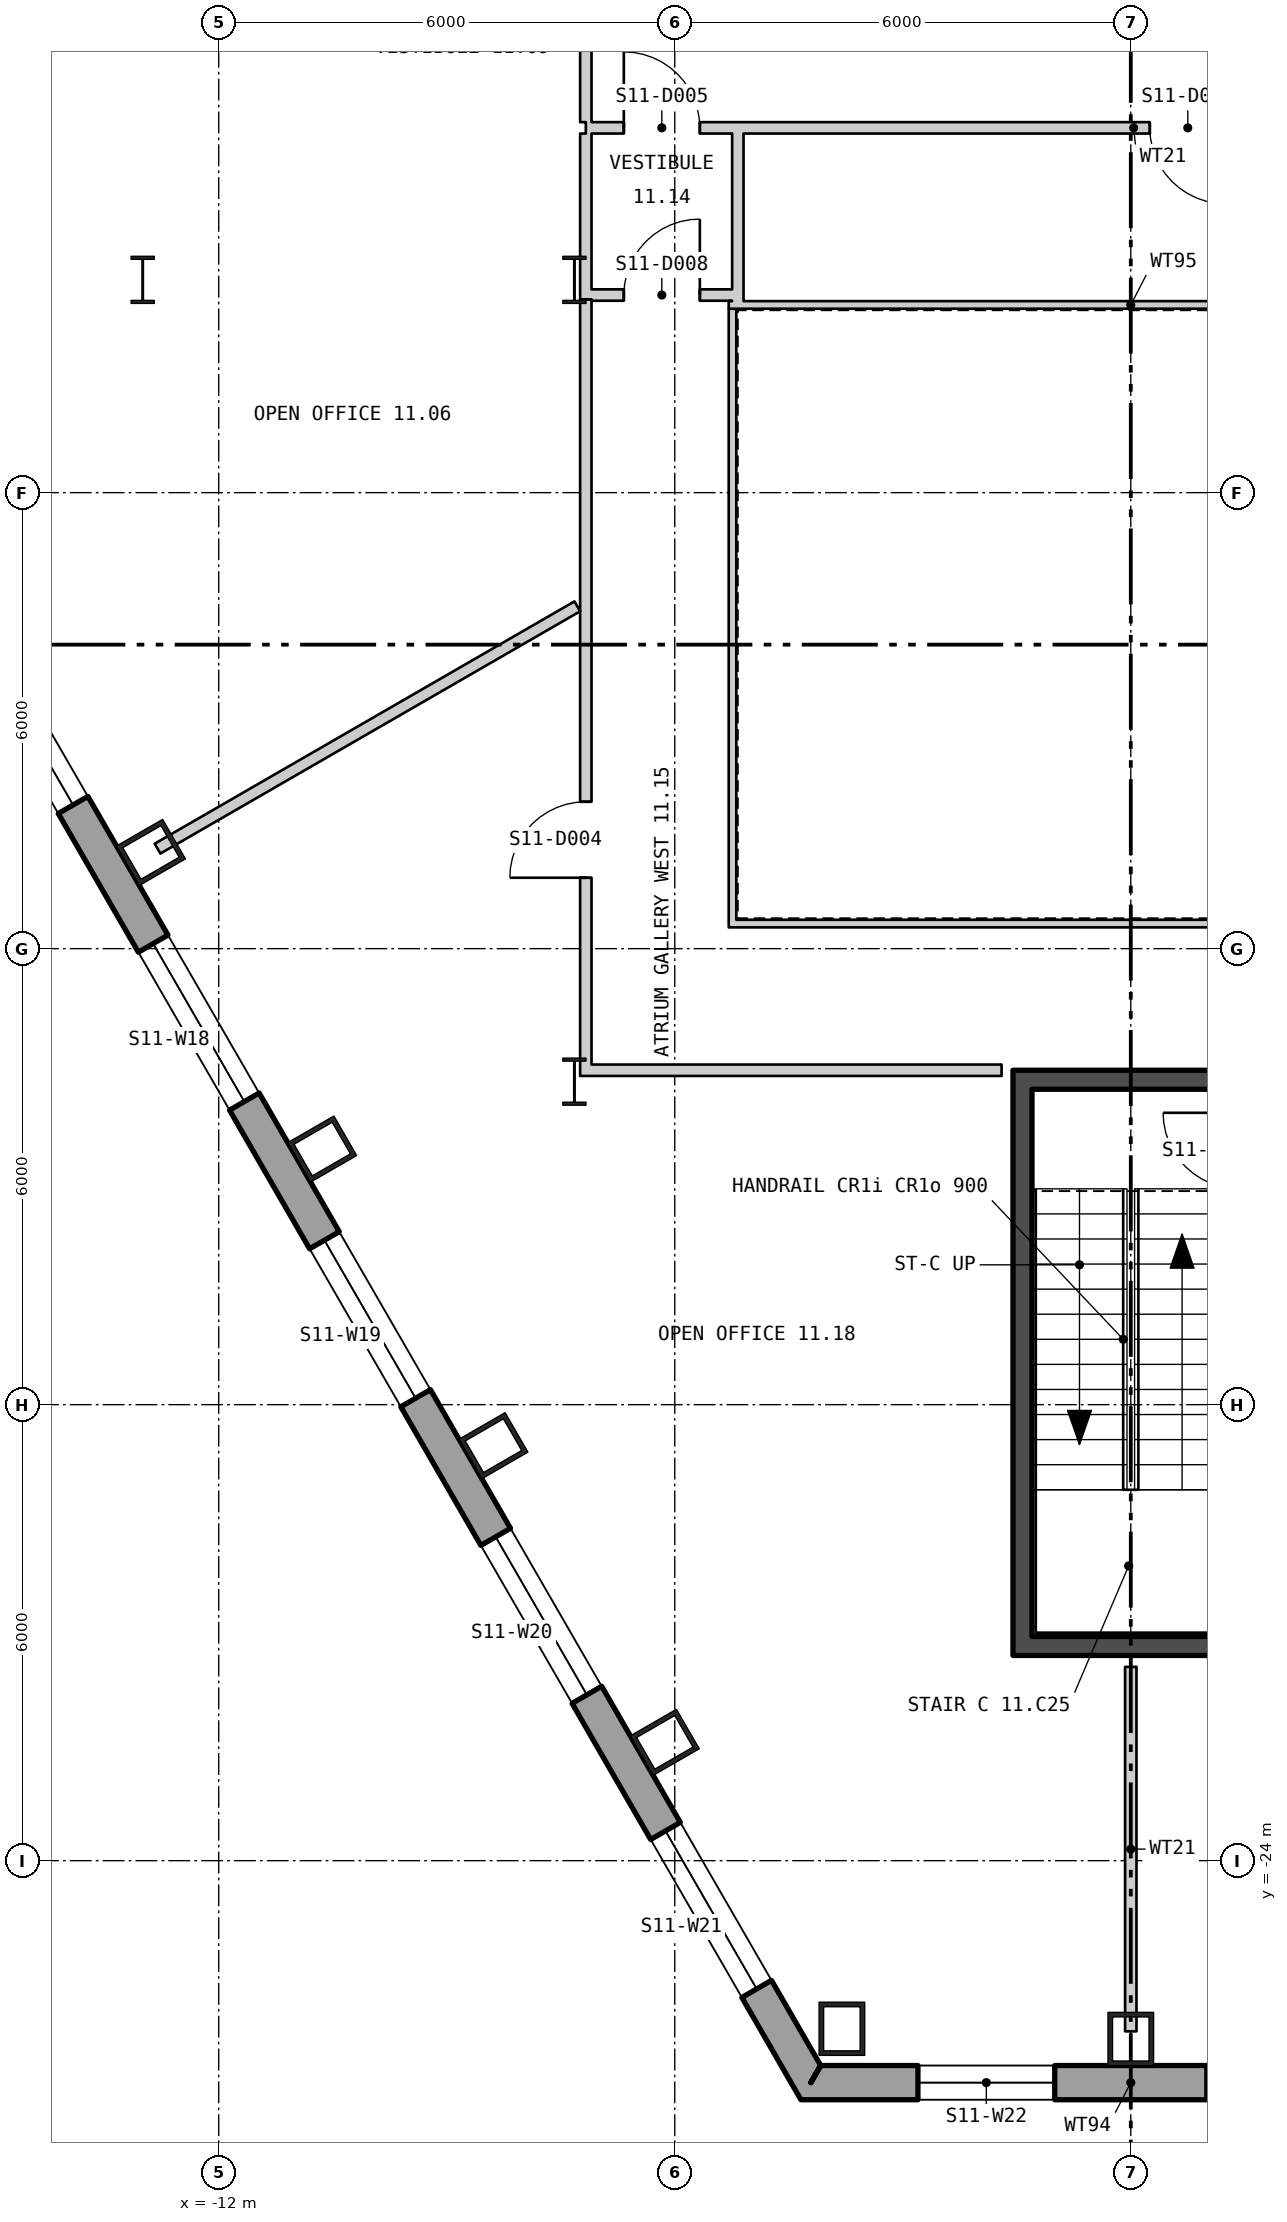
"""IFC4 building model, lengths in metres.
Left out: names, types, materials, properties, quantities, classifications, styles, units other than length and angle.
Written with IfcOpenShell. Run it as: python <this file> out.ifc"""

import sys

from ifc_helpers import new_model, si_unit, direction, frame, frame_2d, origin, origin_2d, place, context, subcontext, project, spatial, polyline, rectangle, hollow_rectangle, i_section, outline, extrude, element, fill, save


model = new_model("IFC4")
c1 = context("Model", 3, precision=1e-05, world=origin(), true_north=direction((0.0, 1.0)))
c2 = subcontext(c1, "Body", "Model", "MODEL_VIEW")
j1 = project(units=[si_unit("LENGTHUNIT", "METRE"), si_unit("PLANEANGLEUNIT", "RADIAN")], contexts=[c1])
p1 = place(None, origin())
s1 = spatial("IfcSite", under=j1, at=p1, CompositionType="ELEMENT")
p2 = place(p1, origin())
s2 = spatial("IfcBuilding", under=s1, at=p2, CompositionType="ELEMENT")
p3 = place(p2, frame((0.0, 0.0, 151.5)))
s3 = spatial("IfcBuildingStorey", under=s2, at=p3, CompositionType="ELEMENT", Elevation=151.5)
for number, where, z_axis, x_axis in (
    (1, (-12.891, -10.734, 0.0), (0.0, 0.0, 1.0), (0.5, -0.866, 0.0)),
    (2, (-10.638, -14.637, 0.0), (0.0, 0.0, 1.0), (0.5, -0.866, 0.0)),
    (3, (-8.385, -18.54, 0.0), (0.0, 0.0, 1.0), (0.5, -0.866, 0.0)),
    (4, (-6.131, -22.443, 0.0), (0.0, 0.0, 1.0), (0.5, -0.866, 0.0)),
    (5, (-3.801, -26.212, 0.0), (0.0, 0.0, 1.0), (1.0, 0.0, 0.0)),
    (6, (0.0, -26.346, 0.0), (0.0, 0.0, 1.0), (1.0, 0.0, 0.0)),
):
    element("IfcColumn", number, at=place(p3, frame(where, z_axis=z_axis, x_axis=x_axis)), inside=s3, PredefinedType="COLUMN", context=c2, shape_type="SweptSolid", body=[
        extrude(hollow_rectangle(XDim=0.6, YDim=0.7, WallThickness=0.06, at=origin_2d()), origin(), (0.0, 0.0, 1.0), 3.9),
    ])
for number, where, z_axis, x_axis in (
    (7, (-7.32, -3.2, 0.0), (0.0, 0.0, 1.0), (1.0, 0.0, 0.0)),
    (8, (-7.32, -13.75, 0.0), (0.0, 0.0, 1.0), (1.0, 0.0, 0.0)),
    (9, (-13.0, -3.2, 0.0), (0.0, 0.0, 1.0), (1.0, 0.0, 0.0)),
):
    element("IfcColumn", number, at=place(p3, frame(where, z_axis=z_axis, x_axis=x_axis)), inside=s3, PredefinedType="COLUMN", context=c2, shape_type="SweptSolid", body=[
        extrude(i_section(OverallWidth=0.305, OverallDepth=0.62, WebThickness=0.021, FlangeThickness=0.04, at=origin_2d()), origin(), (0.0, 0.0, 1.0), 3.9),
    ])
p4 = place(p3, frame((-27.075, 12.683, -0.18), z_axis=(0.0, 0.0, 1.0), x_axis=(0.500000141277, -0.866025322218, 0.0)))
e10 = element("IfcWall", 10, at=p4, inside=s3, PredefinedType="SOLIDWALL", context=c2, shape_type="SweptSolid", body=[
    extrude(outline(polyline([(-0.13, -0.225), (45.86, -0.225), (45.6, 0.225), (0.13, 0.225), (-0.13, -0.225)])), origin(), (0.0, 0.0, 1.0), 3.68),
])
p5 = place(p4, frame((1.424, 0.0, 1.08)))
e11 = element("IfcOpeningElement", 11, at=p5, cuts=e10, PredefinedType="OPENING", context=c2, shape_type="SweptSolid", body=[
    extrude(rectangle(XDim=2.4, YDim=2.0, at=frame_2d((1.2, 1.0))), frame((0.0, 0.235, 0.0), z_axis=(0.0, -1.0, 0.0), x_axis=(1.0, 0.0, 0.0)), (0.0, 0.0, 1.0), 0.47),
])
p6 = place(p4, frame((5.892, 0.0, 1.08)))
e12 = element("IfcOpeningElement", 12, at=p6, cuts=e10, PredefinedType="OPENING", context=c2, shape_type="SweptSolid", body=[
    extrude(rectangle(XDim=2.4, YDim=2.0, at=frame_2d((1.2, 1.0))), frame((0.0, 0.235, 0.0), z_axis=(0.0, -1.0, 0.0), x_axis=(1.0, 0.0, 0.0)), (0.0, 0.0, 1.0), 0.47),
])
p7 = place(p4, frame((10.399, 0.0, 1.08)))
e13 = element("IfcOpeningElement", 13, at=p7, cuts=e10, PredefinedType="OPENING", context=c2, shape_type="SweptSolid", body=[
    extrude(rectangle(XDim=2.4, YDim=2.0, at=frame_2d((1.2, 1.0))), frame((0.0, 0.235, 0.0), z_axis=(0.0, -1.0, 0.0), x_axis=(1.0, 0.0, 0.0)), (0.0, 0.0, 1.0), 0.47),
])
p8 = place(p4, frame((14.905, 0.0, 1.08)))
e14 = element("IfcOpeningElement", 14, at=p8, cuts=e10, PredefinedType="OPENING", context=c2, shape_type="SweptSolid", body=[
    extrude(rectangle(XDim=2.4, YDim=2.0, at=frame_2d((1.2, 1.0))), frame((0.0, 0.235, 0.0), z_axis=(0.0, -1.0, 0.0), x_axis=(1.0, 0.0, 0.0)), (0.0, 0.0, 1.0), 0.47),
])
p9 = place(p4, frame((19.412, 0.0, 1.08)))
e15 = element("IfcOpeningElement", 15, at=p9, cuts=e10, PredefinedType="OPENING", context=c2, shape_type="SweptSolid", body=[
    extrude(rectangle(XDim=2.4, YDim=2.0, at=frame_2d((1.2, 1.0))), frame((0.0, 0.235, 0.0), z_axis=(0.0, -1.0, 0.0), x_axis=(1.0, 0.0, 0.0)), (0.0, 0.0, 1.0), 0.47),
])
p10 = place(p4, frame((23.918, 0.0, 1.08)))
e16 = element("IfcOpeningElement", 16, at=p10, cuts=e10, PredefinedType="OPENING", context=c2, shape_type="SweptSolid", body=[
    extrude(rectangle(XDim=2.4, YDim=2.0, at=frame_2d((1.2, 1.0))), frame((0.0, 0.235, 0.0), z_axis=(0.0, -1.0, 0.0), x_axis=(1.0, 0.0, 0.0)), (0.0, 0.0, 1.0), 0.47),
])
p11 = place(p4, frame((28.425, 0.0, 1.08)))
e17 = element("IfcOpeningElement", 17, at=p11, cuts=e10, PredefinedType="OPENING", context=c2, shape_type="SweptSolid", body=[
    extrude(rectangle(XDim=2.4, YDim=2.0, at=frame_2d((1.2, 1.0))), frame((0.0, 0.235, 0.0), z_axis=(0.0, -1.0, 0.0), x_axis=(1.0, 0.0, 0.0)), (0.0, 0.0, 1.0), 0.47),
])
p12 = place(p4, frame((32.932, 0.0, 1.08)))
e18 = element("IfcOpeningElement", 18, at=p12, cuts=e10, PredefinedType="OPENING", context=c2, shape_type="SweptSolid", body=[
    extrude(rectangle(XDim=2.4, YDim=2.0, at=frame_2d((1.2, 1.0))), frame((0.0, 0.235, 0.0), z_axis=(0.0, -1.0, 0.0), x_axis=(1.0, 0.0, 0.0)), (0.0, 0.0, 1.0), 0.47),
])
p13 = place(p4, frame((37.438, 0.0, 1.08)))
e19 = element("IfcOpeningElement", 19, at=p13, cuts=e10, PredefinedType="OPENING", context=c2, shape_type="SweptSolid", body=[
    extrude(rectangle(XDim=2.4, YDim=2.0, at=frame_2d((1.2, 1.0))), frame((0.0, 0.235, 0.0), z_axis=(0.0, -1.0, 0.0), x_axis=(1.0, 0.0, 0.0)), (0.0, 0.0, 1.0), 0.47),
])
p14 = place(p4, frame((41.907, 0.0, 1.08)))
e20 = element("IfcOpeningElement", 20, at=p14, cuts=e10, PredefinedType="OPENING", context=c2, shape_type="SweptSolid", body=[
    extrude(rectangle(XDim=2.4, YDim=2.0, at=frame_2d((1.2, 1.0))), frame((0.0, 0.235, 0.0), z_axis=(0.0, -1.0, 0.0), x_axis=(1.0, 0.0, 0.0)), (0.0, 0.0, 1.0), 0.47),
])
p15 = place(p3, frame((-4.21, -26.921, -0.18), z_axis=(0.0, 0.0, 1.0), x_axis=(1.0, 0.0, 0.0)))
e21 = element("IfcWall", 21, at=p15, inside=s3, PredefinedType="SOLIDWALL", context=c2, shape_type="SweptSolid", body=[
    extrude(outline(polyline([(-0.13, -0.225), (8.55, -0.225), (8.29, 0.225), (0.13, 0.225), (-0.13, -0.225)])), origin(), (0.0, 0.0, 1.0), 3.68),
])
p16 = place(p15, frame((1.409, 0.0, 1.08)))
e22 = element("IfcOpeningElement", 22, at=p16, cuts=e21, PredefinedType="OPENING", context=c2, shape_type="SweptSolid", body=[
    extrude(rectangle(XDim=1.8, YDim=2.0, at=frame_2d((0.9, 1.0))), frame((0.0, 0.235, 0.0), z_axis=(0.0, -1.0, 0.0), x_axis=(1.0, 0.0, 0.0)), (0.0, 0.0, 1.0), 0.47),
])
p17 = place(p15, frame((5.211, 0.0, 1.08)))
e23 = element("IfcOpeningElement", 23, at=p17, cuts=e21, PredefinedType="OPENING", context=c2, shape_type="SweptSolid", body=[
    extrude(rectangle(XDim=1.8, YDim=2.0, at=frame_2d((0.9, 1.0))), frame((0.0, 0.235, 0.0), z_axis=(0.0, -1.0, 0.0), x_axis=(1.0, 0.0, 0.0)), (0.0, 0.0, 1.0), 0.47),
])
for number, where, z_axis, x_axis in (
    (24, (-5.29, -11.67, 0.0), (0.0, 0.0, 1.0), (1.0, 0.0, 0.0)),
    (25, (5.29, -3.53, 0.0), (0.0, 0.0, 1.0), (-1.0, 0.0, 0.0)),
):
    element("IfcWall", number, at=place(p3, frame(where, z_axis=z_axis, x_axis=x_axis)), inside=s3, PredefinedType="PARTITIONING", context=c2, shape_type="SweptSolid", body=[
        extrude(rectangle(XDim=10.58, YDim=0.1, at=frame_2d((5.29, 0.0))), origin(), (0.0, 0.0, 1.0), 3.7),
    ])
p18 = place(p3, frame((-5.24, -3.58, 0.0), z_axis=(0.0, 0.0, 1.0), x_axis=(0.0, -1.0, 0.0)))
e26 = element("IfcWall", 26, at=p18, inside=s3, PredefinedType="PARTITIONING", context=c2, shape_type="SweptSolid", body=[
    extrude(rectangle(XDim=8.04, YDim=0.1, at=frame_2d((4.02, 0.0))), origin(), (0.0, 0.0, 1.0), 3.7),
])
p19 = place(p3, frame((-1.425, -21.05, 0.0), z_axis=(0.0, 0.0, 1.0), x_axis=(0.0, 1.0, 0.0)))
e27 = element("IfcWall", 27, at=p19, inside=s3, PredefinedType="SHEAR", context=c2, shape_type="SweptSolid", body=[
    extrude(rectangle(XDim=7.2, YDim=0.25, at=frame_2d((3.6, 0.0))), origin(), (0.0, 0.0, 1.0), 3.7),
])
for number, where, z_axis, x_axis in (
    (28, (-1.55, -21.175, 0.0), (0.0, 0.0, 1.0), (1.0, 0.0, 0.0)),
    (29, (-1.55, -13.725, 0.0), (0.0, 0.0, 1.0), (1.0, 0.0, 0.0)),
):
    element("IfcWall", number, at=place(p3, frame(where, z_axis=z_axis, x_axis=x_axis)), inside=s3, PredefinedType="SHEAR", context=c2, shape_type="SweptSolid", body=[
        extrude(rectangle(XDim=3.1, YDim=0.25, at=frame_2d((1.55, 0.0))), origin(), (0.0, 0.0, 1.0), 3.7),
    ])
p20 = place(p3, frame((-12.805, -10.684, 0.0), z_axis=(0.0, 0.0, 1.0), x_axis=(0.866073306909, 0.499917020175, 0.0)))
e30 = element("IfcWall", 30, at=p20, inside=s3, PredefinedType="PARTITIONING", context=c2, shape_type="SweptSolid", body=[
    extrude(rectangle(XDim=6.377, YDim=0.15, at=frame_2d((3.189, 0.0))), origin(), (0.0, 0.0, 1.0), 3.7),
])
p21 = place(p3, frame((-7.17, -13.675, 0.0), z_axis=(0.0, 0.0, 1.0), x_axis=(0.0, 1.0, 0.0)))
e31 = element("IfcWall", 31, at=p21, inside=s3, PredefinedType="PARTITIONING", context=c2, shape_type="SweptSolid", body=[
    extrude(rectangle(XDim=10.215, YDim=0.15, at=frame_2d((5.107, 0.0))), origin(), (0.0, 0.0, 1.0), 3.11),
])
p22 = place(p21, frame((2.608, 0.0, 0.0)))
e32 = element("IfcOpeningElement", 32, at=p22, cuts=e31, PredefinedType="OPENING", context=c2, shape_type="SweptSolid", body=[
    extrude(rectangle(XDim=1.0, YDim=2.1, at=frame_2d((0.5, 1.05))), frame((0.0, 0.085, 0.0), z_axis=(0.0, -1.0, 0.0), x_axis=(1.0, 0.0, 0.0)), (0.0, 0.0, 1.0), 0.17),
])
p23 = place(p3, frame((-7.17, -3.46, 0.0), z_axis=(0.0, 0.0, 1.0), x_axis=(0.0, 1.0, 0.0)))
e33 = element("IfcWall", 33, at=p23, inside=s3, PredefinedType="PARTITIONING", context=c2, shape_type="SweptSolid", body=[
    extrude(rectangle(XDim=2.185, YDim=0.15, at=frame_2d((1.093, 0.0))), origin(), (0.0, 0.0, 1.0), 3.7),
])
p24 = place(p3, frame((-7.17, -1.2, 0.0), z_axis=(0.0, 0.0, 1.0), x_axis=(1.0, 0.0, 0.0)))
e34 = element("IfcWall", 34, at=p24, inside=s3, PredefinedType="PARTITIONING", context=c2, shape_type="SweptSolid", body=[
    extrude(rectangle(XDim=14.415, YDim=0.15, at=frame_2d((7.207, 0.0))), origin(), (0.0, 0.0, 1.0), 3.7),
])
p25 = place(p24, frame((0.5, 0.0, 0.0)))
e35 = element("IfcOpeningElement", 35, at=p25, cuts=e34, PredefinedType="OPENING", context=c2, shape_type="SweptSolid", body=[
    extrude(rectangle(XDim=1.0, YDim=2.1, at=frame_2d((0.5, 1.05))), frame((0.0, 0.085, 0.0), z_axis=(0.0, -1.0, 0.0), x_axis=(1.0, 0.0, 0.0)), (0.0, 0.0, 1.0), 0.17),
])
p26 = place(p24, frame((7.42, 0.0, 0.0)))
e36 = element("IfcOpeningElement", 36, at=p26, cuts=e34, PredefinedType="OPENING", context=c2, shape_type="SweptSolid", body=[
    extrude(rectangle(XDim=1.0, YDim=2.1, at=frame_2d((0.5, 1.05))), frame((0.0, 0.085, 0.0), z_axis=(0.0, -1.0, 0.0), x_axis=(1.0, 0.0, 0.0)), (0.0, 0.0, 1.0), 0.17),
])
p27 = place(p3, frame((-7.17, -1.125, 0.0), z_axis=(0.0, 0.0, 1.0), x_axis=(0.0, 1.0, 0.0)))
e37 = element("IfcWall", 37, at=p27, inside=s3, PredefinedType="PARTITIONING", context=c2, shape_type="SweptSolid", body=[
    extrude(rectangle(XDim=1.322, YDim=0.15, at=frame_2d((0.661, 0.0))), origin(), (0.0, 0.0, 1.0), 3.7),
])
p28 = place(p3, frame((-7.095, -13.6, 0.0), z_axis=(0.0, 0.0, 1.0), x_axis=(1.0, 0.0, 0.0)))
e38 = element("IfcWall", 38, at=p28, inside=s3, PredefinedType="PARTITIONING", context=c2, shape_type="SweptSolid", body=[
    extrude(rectangle(XDim=5.395, YDim=0.15, at=frame_2d((2.697, 0.0))), origin(), (0.0, 0.0, 1.0), 2.886),
])
p29 = place(p3, frame((-7.095, -3.4, 0.0), z_axis=(0.0, 0.0, 1.0), x_axis=(1.0, 0.0, 0.0)))
e39 = element("IfcWall", 39, at=p29, inside=s3, PredefinedType="PARTITIONING", context=c2, shape_type="SweptSolid", body=[
    extrude(rectangle(XDim=1.85, YDim=0.15, at=frame_2d((0.925, 0.0))), origin(), (0.0, 0.0, 1.0), 3.7),
])
p30 = place(p29, frame((0.425, 0.0, 0.0)))
e40 = element("IfcOpeningElement", 40, at=p30, cuts=e39, PredefinedType="OPENING", context=c2, shape_type="SweptSolid", body=[
    extrude(rectangle(XDim=1.0, YDim=2.1, at=frame_2d((0.5, 1.05))), frame((0.0, 0.085, 0.0), z_axis=(0.0, -1.0, 0.0), x_axis=(1.0, 0.0, 0.0)), (0.0, 0.0, 1.0), 0.17),
])
p31 = place(p3, frame((-5.17, -3.48, 0.0), z_axis=(0.0, 0.0, 1.0), x_axis=(0.0, 1.0, 0.0)))
e41 = element("IfcWall", 41, at=p31, inside=s3, PredefinedType="PARTITIONING", context=c2, shape_type="SweptSolid", body=[
    extrude(rectangle(XDim=2.205, YDim=0.15, at=frame_2d((1.103, 0.0))), origin(), (0.0, 0.0, 1.0), 3.7),
])
p32 = place(p3, frame((0.0, -26.246, 0.0), z_axis=(0.0, 0.0, 1.0), x_axis=(0.0, 1.0, 0.0)))
e42 = element("IfcWall", 42, at=p32, inside=s3, PredefinedType="PARTITIONING", context=c2, shape_type="SweptSolid", body=[
    extrude(rectangle(XDim=4.796, YDim=0.15, at=frame_2d((2.398, 0.0))), origin(), (0.0, 0.0, 1.0), 3.15),
])
p33 = place(p10, origin())
e43 = element("IfcWindow", 43, at=p33, inside=s3, PartitioningType="SINGLE_PANEL", PredefinedType="WINDOW", context=c2, shape_type="SweptSolid", body=[
    extrude(rectangle(XDim=2.4, YDim=2.0, at=frame_2d((1.2, 1.0))), frame((0.0, 0.105, 0.0), z_axis=(0.0, -1.0, 0.0), x_axis=(1.0, 0.0, 0.0)), (0.0, 0.0, 1.0), 0.06),
])
fill(e16, e43)
p34 = place(p11, origin())
e44 = element("IfcWindow", 44, at=p34, inside=s3, PartitioningType="SINGLE_PANEL", PredefinedType="WINDOW", context=c2, shape_type="SweptSolid", body=[
    extrude(rectangle(XDim=2.4, YDim=2.0, at=frame_2d((1.2, 1.0))), frame((0.0, 0.105, 0.0), z_axis=(0.0, -1.0, 0.0), x_axis=(1.0, 0.0, 0.0)), (0.0, 0.0, 1.0), 0.06),
])
fill(e17, e44)
p35 = place(p12, origin())
e45 = element("IfcWindow", 45, at=p35, inside=s3, PartitioningType="SINGLE_PANEL", PredefinedType="WINDOW", context=c2, shape_type="SweptSolid", body=[
    extrude(rectangle(XDim=2.4, YDim=2.0, at=frame_2d((1.2, 1.0))), frame((0.0, 0.105, 0.0), z_axis=(0.0, -1.0, 0.0), x_axis=(1.0, 0.0, 0.0)), (0.0, 0.0, 1.0), 0.06),
])
fill(e18, e45)
p36 = place(p13, origin())
e46 = element("IfcWindow", 46, at=p36, inside=s3, PartitioningType="SINGLE_PANEL", PredefinedType="WINDOW", context=c2, shape_type="SweptSolid", body=[
    extrude(rectangle(XDim=2.4, YDim=2.0, at=frame_2d((1.2, 1.0))), frame((0.0, 0.105, 0.0), z_axis=(0.0, -1.0, 0.0), x_axis=(1.0, 0.0, 0.0)), (0.0, 0.0, 1.0), 0.06),
])
fill(e19, e46)
p37 = place(p14, origin())
e47 = element("IfcWindow", 47, at=p37, inside=s3, PartitioningType="SINGLE_PANEL", PredefinedType="WINDOW", context=c2, shape_type="SweptSolid", body=[
    extrude(rectangle(XDim=2.4, YDim=2.0, at=frame_2d((1.2, 1.0))), frame((0.0, 0.105, 0.0), z_axis=(0.0, -1.0, 0.0), x_axis=(1.0, 0.0, 0.0)), (0.0, 0.0, 1.0), 0.06),
])
fill(e20, e47)
p38 = place(p16, origin())
e48 = element("IfcWindow", 48, at=p38, inside=s3, PartitioningType="SINGLE_PANEL", PredefinedType="WINDOW", context=c2, shape_type="SweptSolid", body=[
    extrude(rectangle(XDim=1.8, YDim=2.0, at=frame_2d((0.9, 1.0))), frame((0.0, 0.105, 0.0), z_axis=(0.0, -1.0, 0.0), x_axis=(1.0, 0.0, 0.0)), (0.0, 0.0, 1.0), 0.06),
])
fill(e22, e48)
p39 = place(p22, origin())
e49 = element("IfcDoor", 49, at=p39, inside=s3, OperationType="SINGLE_SWING_RIGHT", PredefinedType="DOOR", context=c2, shape_type="SweptSolid", body=[
    extrude(rectangle(XDim=1.0, YDim=2.1, at=frame_2d((0.5, 1.05))), frame((0.0, 0.025, 0.0), z_axis=(0.0, -1.0, 0.0), x_axis=(1.0, 0.0, 0.0)), (0.0, 0.0, 1.0), 0.05),
])
fill(e32, e49)
p40 = place(p25, origin())
e50 = element("IfcDoor", 50, at=p40, inside=s3, OperationType="SINGLE_SWING_RIGHT", PredefinedType="DOOR", context=c2, shape_type="SweptSolid", body=[
    extrude(rectangle(XDim=1.0, YDim=2.1, at=frame_2d((0.5, 1.05))), frame((0.0, 0.025, 0.0), z_axis=(0.0, -1.0, 0.0), x_axis=(1.0, 0.0, 0.0)), (0.0, 0.0, 1.0), 0.05),
])
fill(e35, e50)
p41 = place(p26, origin())
e51 = element("IfcDoor", 51, at=p41, inside=s3, OperationType="SINGLE_SWING_RIGHT", PredefinedType="DOOR", context=c2, shape_type="SweptSolid", body=[
    extrude(rectangle(XDim=1.0, YDim=2.1, at=frame_2d((0.5, 1.05))), frame((0.0, 0.025, 0.0), z_axis=(0.0, -1.0, 0.0), x_axis=(1.0, 0.0, 0.0)), (0.0, 0.0, 1.0), 0.05),
])
fill(e36, e51)
p42 = place(p30, origin())
e52 = element("IfcDoor", 52, at=p42, inside=s3, OperationType="SINGLE_SWING_LEFT", PredefinedType="DOOR", context=c2, shape_type="SweptSolid", body=[
    extrude(rectangle(XDim=1.0, YDim=2.1, at=frame_2d((0.5, 1.05))), frame((0.0, 0.025, 0.0), z_axis=(0.0, -1.0, 0.0), x_axis=(1.0, 0.0, 0.0)), (0.0, 0.0, 1.0), 0.05),
])
fill(e40, e52)
save(model, sys.argv[1])
